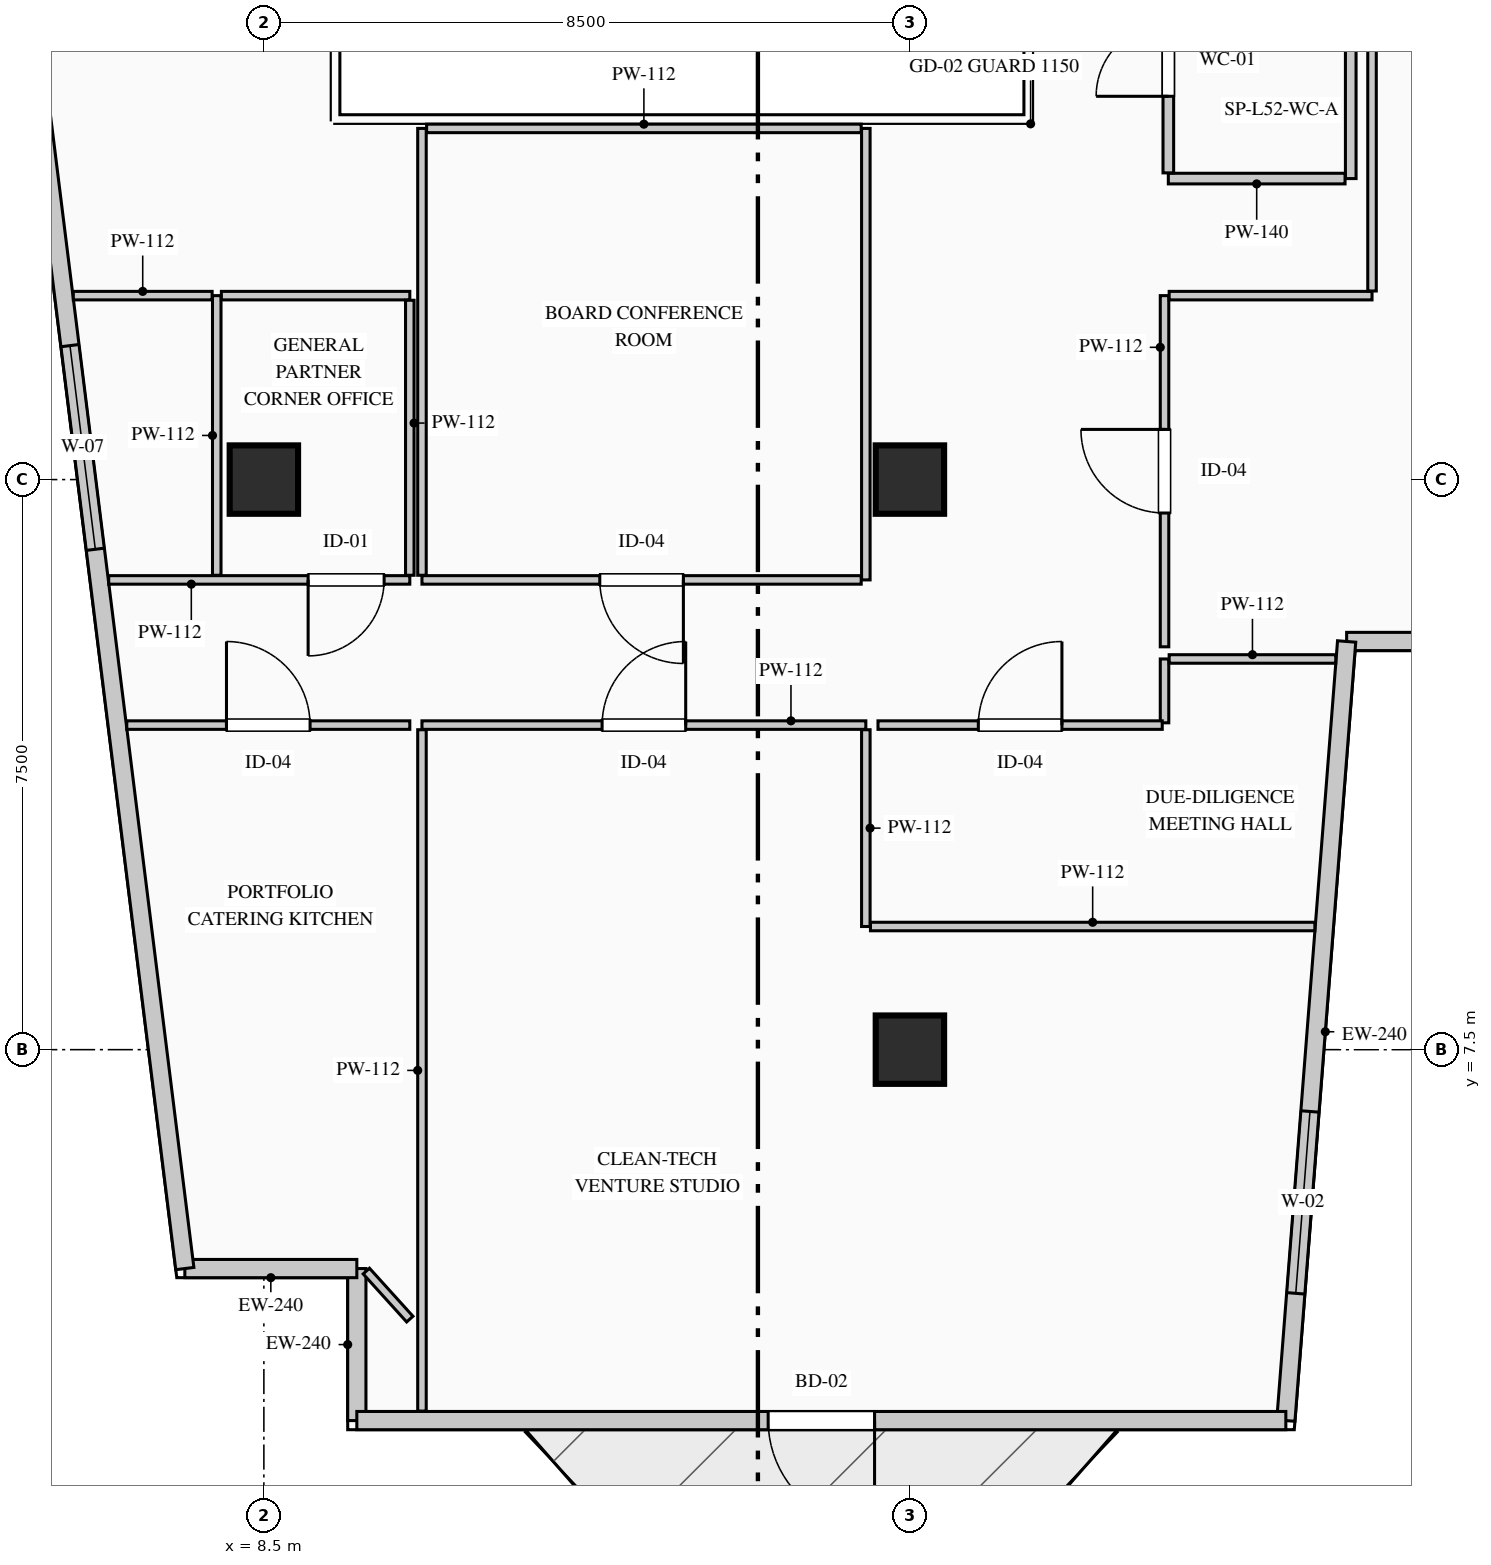
"""IFC4 building model, lengths in metres.
Left out: names, types, materials, properties, quantities, classifications, styles, units other than length and angle.
Written with IfcOpenShell. Run it as: python <this file> out.ifc"""

import sys

from ifc_helpers import new_model, si_unit, direction, frame, frame_2d, origin, origin_2d, place, context, subcontext, project, spatial, rectangle, extrude, element, fill, save


model = new_model("IFC4")
c1 = context("Model", 3, precision=1e-05, world=origin(), true_north=direction((0.0, 1.0)))
c2 = subcontext(c1, "Body", "Model", "MODEL_VIEW")
j1 = project(units=[si_unit("LENGTHUNIT", "METRE"), si_unit("PLANEANGLEUNIT", "RADIAN")], contexts=[c1])
p1 = place(None, origin())
s1 = spatial("IfcSite", under=j1, at=p1, CompositionType="ELEMENT")
p2 = place(p1, origin())
s2 = spatial("IfcBuilding", under=s1, at=p2, CompositionType="ELEMENT")
p3 = place(p2, frame((0.0, 0.0, 219.3)))
s3 = spatial("IfcBuildingStorey", under=s2, at=p3, CompositionType="ELEMENT", Elevation=219.3)
for number, where, z_axis, x_axis in (
    (1, (8.5, 15.0, 0.0), (0.0, 0.0, 1.0), (1.0, 0.0, 0.0)),
    (2, (17.0, 7.5, 0.0), (0.0, 0.0, 1.0), (1.0, 0.0, 0.0)),
    (3, (17.0, 15.0, 0.0), (0.0, 0.0, 1.0), (1.0, 0.0, 0.0)),
):
    element("IfcColumn", number, at=place(p3, frame(where, z_axis=z_axis, x_axis=x_axis)), inside=s3, PredefinedType="COLUMN", context=c2, shape_type="SweptSolid", body=[
        extrude(rectangle(XDim=0.9, YDim=0.9, at=origin_2d()), origin(), (0.0, 0.0, 1.0), 3.95),
    ])
p4 = place(p3, frame((9.723, 2.62, 0.0), z_axis=(0.0, 0.0, 1.0), x_axis=(0.0, 1.0, 0.0)))
e4 = element("IfcWall", 4, at=p4, inside=s3, PredefinedType="STANDARD", context=c2, shape_type="SweptSolid", body=[
    extrude(rectangle(XDim=2.0, YDim=0.24, at=frame_2d((1.0, 0.0))), origin(), (0.0, 0.0, 1.0), 3.7),
])
p5 = place(p3, frame((9.723, 4.62, 0.0), z_axis=(0.0, 0.0, 1.0), x_axis=(-1.0, 0.0, 0.0)))
e5 = element("IfcWall", 5, at=p5, inside=s3, PredefinedType="STANDARD", context=c2, shape_type="SweptSolid", body=[
    extrude(rectangle(XDim=2.263, YDim=0.24, at=frame_2d((1.131, 0.0))), origin(), (0.0, 0.0, 1.0), 3.7),
])
p6 = place(p3, frame((7.46, 4.62, 0.0), z_axis=(0.0, 0.0, 1.0), x_axis=(-0.123515576323, 0.992342633573, 0.0)))
e6 = element("IfcWall", 6, at=p6, inside=s3, PredefinedType="STANDARD", context=c2, shape_type="SweptSolid", body=[
    extrude(rectangle(XDim=37.043, YDim=0.24, at=frame_2d((18.522, 0.0))), origin(), (0.0, 0.0, 1.0), 3.7),
])
p7 = place(p6, frame((9.536, 0.0, 0.9)))
e7 = element("IfcOpeningElement", 7, at=p7, cuts=e6, PredefinedType="OPENING", context=c2, shape_type="SweptSolid", body=[
    extrude(rectangle(XDim=2.7, YDim=2.1, at=frame_2d((1.35, 1.05))), frame((0.0, 0.13, 0.0), z_axis=(0.0, -1.0, 0.0), x_axis=(1.0, 0.0, 0.0)), (0.0, 0.0, 1.0), 0.26),
])
p8 = place(p3, frame((29.581, 12.87, 0.0), z_axis=(0.0, 0.0, 1.0), x_axis=(-1.0, 0.0, 0.0)))
e8 = element("IfcWall", 8, at=p8, inside=s3, PredefinedType="STANDARD", context=c2, shape_type="SweptSolid", body=[
    extrude(rectangle(XDim=6.834, YDim=0.24, at=frame_2d((3.417, 0.0))), origin(), (0.0, 0.0, 1.0), 3.7),
])
p9 = place(p8, frame((1.26, 0.0, 0.9)))
e9 = element("IfcOpeningElement", 9, at=p9, cuts=e8, PredefinedType="OPENING", context=c2, shape_type="SweptSolid", body=[
    extrude(rectangle(XDim=2.4, YDim=2.1, at=frame_2d((1.2, 1.05))), frame((0.0, 0.13, 0.0), z_axis=(0.0, -1.0, 0.0), x_axis=(1.0, 0.0, 0.0)), (0.0, 0.0, 1.0), 0.26),
])
p10 = place(p3, frame((22.746, 12.87, 0.0), z_axis=(0.0, 0.0, 1.0), x_axis=(-0.077816860153, -0.996967670627, 0.0)))
e10 = element("IfcWall", 10, at=p10, inside=s3, PredefinedType="STANDARD", context=c2, shape_type="SweptSolid", body=[
    extrude(rectangle(XDim=10.281, YDim=0.24, at=frame_2d((5.141, 0.0))), origin(), (0.0, 0.0, 1.0), 3.7),
])
p11 = place(p10, frame((6.202, 0.0, 0.9)))
e11 = element("IfcOpeningElement", 11, at=p11, cuts=e10, PredefinedType="OPENING", context=c2, shape_type="SweptSolid", body=[
    extrude(rectangle(XDim=2.4, YDim=2.1, at=frame_2d((1.2, 1.05))), frame((0.0, 0.13, 0.0), z_axis=(0.0, -1.0, 0.0), x_axis=(1.0, 0.0, 0.0)), (0.0, 0.0, 1.0), 0.26),
])
p12 = place(p3, frame((21.946, 2.62, 0.0), z_axis=(0.0, 0.0, 1.0), x_axis=(-1.0, 0.0, 0.0)))
e12 = element("IfcWall", 12, at=p12, inside=s3, PredefinedType="STANDARD", context=c2, shape_type="SweptSolid", body=[
    extrude(rectangle(XDim=12.223, YDim=0.24, at=frame_2d((6.112, 0.0))), origin(), (0.0, 0.0, 1.0), 3.7),
])
p13 = place(p12, frame((5.411, 0.0, 0.0)))
e13 = element("IfcOpeningElement", 13, at=p13, cuts=e12, PredefinedType="OPENING", context=c2, shape_type="SweptSolid", body=[
    extrude(rectangle(XDim=1.4, YDim=2.2, at=frame_2d((0.7, 1.1))), frame((0.0, 0.13, 0.0), z_axis=(0.0, -1.0, 0.0), x_axis=(1.0, 0.0, 0.0)), (0.0, 0.0, 1.0), 0.26),
])
p14 = place(p3, frame((22.8, 22.0, 0.0), z_axis=(0.0, 0.0, 1.0), x_axis=(0.0, -1.0, 0.0)))
e14 = element("IfcWall", 14, at=p14, inside=s3, PredefinedType="PARTITIONING", context=c2, shape_type="SweptSolid", body=[
    extrude(rectangle(XDim=3.04, YDim=0.14, at=frame_2d((1.52, 0.0))), origin(), (0.0, 0.0, 1.0), 3.385),
])
p15 = place(p3, frame((22.725, 18.96, 0.0), z_axis=(0.0, 0.0, 1.0), x_axis=(-1.0, 0.0, 0.0)))
e15 = element("IfcWall", 15, at=p15, inside=s3, PredefinedType="PARTITIONING", context=c2, shape_type="SweptSolid", body=[
    extrude(rectangle(XDim=2.325, YDim=0.14, at=frame_2d((1.163, 0.0))), origin(), (0.0, 0.0, 1.0), 3.7),
])
p16 = place(p3, frame((20.4, 19.035, 0.0), z_axis=(0.0, 0.0, 1.0), x_axis=(0.0, 1.0, 0.0)))
e16 = element("IfcWall", 16, at=p16, inside=s3, PredefinedType="PARTITIONING", context=c2, shape_type="SweptSolid", body=[
    extrude(rectangle(XDim=2.965, YDim=0.14, at=frame_2d((1.482, 0.0))), origin(), (0.0, 0.0, 1.0), 3.7),
])
p17 = place(p16, frame((1.008, 0.0, 0.0)))
e17 = element("IfcOpeningElement", 17, at=p17, cuts=e16, PredefinedType="OPENING", context=c2, shape_type="SweptSolid", body=[
    extrude(rectangle(XDim=0.95, YDim=2.15, at=frame_2d((0.475, 1.075))), frame((0.0, 0.08, 0.0), z_axis=(0.0, -1.0, 0.0), x_axis=(1.0, 0.0, 0.0)), (0.0, 0.0, 1.0), 0.16),
])
p18 = place(p3, frame((10.58, 11.77, 0.0), z_axis=(0.0, 0.0, 1.0), x_axis=(1.0, 0.0, 0.0)))
e18 = element("IfcWall", 18, at=p18, inside=s3, PredefinedType="PARTITIONING", context=c2, shape_type="SweptSolid", body=[
    extrude(rectangle(XDim=5.84, YDim=0.112, at=frame_2d((2.92, 0.0))), origin(), (0.0, 0.0, 1.0), 3.7),
])
p19 = place(p18, frame((2.37, 0.0, 0.0)))
e19 = element("IfcOpeningElement", 19, at=p19, cuts=e18, PredefinedType="OPENING", context=c2, shape_type="SweptSolid", body=[
    extrude(rectangle(XDim=1.1, YDim=2.2, at=frame_2d((0.55, 1.1))), frame((0.0, 0.066, 0.0), z_axis=(0.0, -1.0, 0.0), x_axis=(1.0, 0.0, 0.0)), (0.0, 0.0, 1.0), 0.132),
])
p20 = place(p3, frame((16.42, 11.709, 0.0), z_axis=(0.0, 0.0, 1.0), x_axis=(0.0, -1.0, 0.0)))
e20 = element("IfcWall", 20, at=p20, inside=s3, PredefinedType="PARTITIONING", context=c2, shape_type="SweptSolid", body=[
    extrude(rectangle(XDim=2.589, YDim=0.112, at=frame_2d((1.294, 0.0))), origin(), (0.0, 0.0, 1.0), 3.7),
])
p21 = place(p3, frame((16.481, 9.12, 0.0), z_axis=(0.0, 0.0, 1.0), x_axis=(1.0, 0.0, 0.0)))
e21 = element("IfcWall", 21, at=p21, inside=s3, PredefinedType="PARTITIONING", context=c2, shape_type="SweptSolid", body=[
    extrude(rectangle(XDim=5.847, YDim=0.112, at=frame_2d((2.923, 0.0))), origin(), (0.0, 0.0, 1.0), 3.7),
])
p22 = place(p3, frame((10.58, 2.745, 0.0), z_axis=(0.0, 0.0, 1.0), x_axis=(0.0, 1.0, 0.0)))
e22 = element("IfcWall", 22, at=p22, inside=s3, PredefinedType="PARTITIONING", context=c2, shape_type="SweptSolid", body=[
    extrude(rectangle(XDim=8.964, YDim=0.112, at=frame_2d((4.482, 0.0))), origin(), (0.0, 0.0, 1.0), 3.7),
])
p23 = place(p3, frame((10.42, 3.955, 0.0), z_axis=(0.0, 0.0, 1.0), x_axis=(-0.671145806114, 0.741325371841, 0.0)))
e23 = element("IfcWall", 23, at=p23, inside=s3, PredefinedType="PARTITIONING", context=c2, shape_type="SweptSolid", body=[
    extrude(rectangle(XDim=0.852, YDim=0.112, at=frame_2d((0.426, 0.0))), origin(), (0.0, 0.0, 1.0), 3.7),
])
p24 = place(p3, frame((6.696, 11.77, 0.0), z_axis=(0.0, 0.0, 1.0), x_axis=(1.0, 0.0, 0.0)))
e24 = element("IfcWall", 24, at=p24, inside=s3, PredefinedType="PARTITIONING", context=c2, shape_type="SweptSolid", body=[
    extrude(rectangle(XDim=3.724, YDim=0.112, at=frame_2d((1.862, 0.0))), origin(), (0.0, 0.0, 1.0), 3.7),
])
p25 = place(p24, frame((1.312, 0.0, 0.0)))
e25 = element("IfcOpeningElement", 25, at=p25, cuts=e24, PredefinedType="OPENING", context=c2, shape_type="SweptSolid", body=[
    extrude(rectangle(XDim=1.1, YDim=2.2, at=frame_2d((0.55, 1.1))), frame((0.0, 0.066, 0.0), z_axis=(0.0, -1.0, 0.0), x_axis=(1.0, 0.0, 0.0)), (0.0, 0.0, 1.0), 0.132),
])
p26 = place(p3, frame((20.35, 11.8, 0.0), z_axis=(0.0, 0.0, 1.0), x_axis=(0.0, 1.0, 0.0)))
e26 = element("IfcWall", 26, at=p26, inside=s3, PredefinedType="PARTITIONING", context=c2, shape_type="SweptSolid", body=[
    extrude(rectangle(XDim=0.84, YDim=0.112, at=frame_2d((0.42, 0.0))), origin(), (0.0, 0.0, 1.0), 3.7),
])
p27 = place(p3, frame((20.411, 12.64, 0.0), z_axis=(0.0, 0.0, 1.0), x_axis=(1.0, 0.0, 0.0)))
e27 = element("IfcWall", 27, at=p27, inside=s3, PredefinedType="PARTITIONING", context=c2, shape_type="SweptSolid", body=[
    extrude(rectangle(XDim=2.192, YDim=0.112, at=frame_2d((1.096, 0.0))), origin(), (0.0, 0.0, 1.0), 3.7),
])
p28 = place(p3, frame((16.58, 11.77, 0.0), z_axis=(0.0, 0.0, 1.0), x_axis=(1.0, 0.0, 0.0)))
e28 = element("IfcWall", 28, at=p28, inside=s3, PredefinedType="PARTITIONING", context=c2, shape_type="SweptSolid", body=[
    extrude(rectangle(XDim=3.74, YDim=0.112, at=frame_2d((1.87, 0.0))), origin(), (0.0, 0.0, 1.0), 3.7),
])
p29 = place(p28, frame((1.32, 0.0, 0.0)))
e29 = element("IfcOpeningElement", 29, at=p29, cuts=e28, PredefinedType="OPENING", context=c2, shape_type="SweptSolid", body=[
    extrude(rectangle(XDim=1.1, YDim=2.2, at=frame_2d((0.55, 1.1))), frame((0.0, 0.066, 0.0), z_axis=(0.0, -1.0, 0.0), x_axis=(1.0, 0.0, 0.0)), (0.0, 0.0, 1.0), 0.132),
])
p30 = place(p3, frame((10.42, 13.68, 0.0), z_axis=(0.0, 0.0, 1.0), x_axis=(-1.0, 0.0, 0.0)))
e30 = element("IfcWall", 30, at=p30, inside=s3, PredefinedType="PARTITIONING", context=c2, shape_type="SweptSolid", body=[
    extrude(rectangle(XDim=3.961, YDim=0.112, at=frame_2d((1.981, 0.0))), origin(), (0.0, 0.0, 1.0), 3.7),
])
p31 = place(p30, frame((0.338, 0.0, 0.0)))
e31 = element("IfcOpeningElement", 31, at=p31, cuts=e30, PredefinedType="OPENING", context=c2, shape_type="SweptSolid", body=[
    extrude(rectangle(XDim=1.0, YDim=2.15, at=frame_2d((0.5, 1.075))), frame((0.0, 0.066, 0.0), z_axis=(0.0, -1.0, 0.0), x_axis=(1.0, 0.0, 0.0)), (0.0, 0.0, 1.0), 0.132),
])
p32 = place(p3, frame((7.88, 13.741, 0.0), z_axis=(0.0, 0.0, 1.0), x_axis=(0.0, 1.0, 0.0)))
e32 = element("IfcWall", 32, at=p32, inside=s3, PredefinedType="PARTITIONING", context=c2, shape_type="SweptSolid", body=[
    extrude(rectangle(XDim=3.679, YDim=0.112, at=frame_2d((1.839, 0.0))), origin(), (0.0, 0.0, 1.0), 3.7),
])
p33 = place(p3, frame((5.993, 17.42, 0.0), z_axis=(0.0, 0.0, 1.0), x_axis=(1.0, 0.0, 0.0)))
e33 = element("IfcWall", 33, at=p33, inside=s3, PredefinedType="PARTITIONING", context=c2, shape_type="SweptSolid", body=[
    extrude(rectangle(XDim=1.826, YDim=0.112, at=frame_2d((0.913, 0.0))), origin(), (0.0, 0.0, 1.0), 3.7),
])
p34 = place(p3, frame((7.941, 17.42, 0.0), z_axis=(0.0, 0.0, 1.0), x_axis=(1.0, 0.0, 0.0)))
e34 = element("IfcWall", 34, at=p34, inside=s3, PredefinedType="PARTITIONING", context=c2, shape_type="SweptSolid", body=[
    extrude(rectangle(XDim=2.479, YDim=0.112, at=frame_2d((1.24, 0.0))), origin(), (0.0, 0.0, 1.0), 3.7),
])
p35 = place(p3, frame((10.42, 17.359, 0.0), z_axis=(0.0, 0.0, 1.0), x_axis=(0.0, -1.0, 0.0)))
e35 = element("IfcWall", 35, at=p35, inside=s3, PredefinedType="PARTITIONING", context=c2, shape_type="SweptSolid", body=[
    extrude(rectangle(XDim=3.618, YDim=0.112, at=frame_2d((1.809, 0.0))), origin(), (0.0, 0.0, 1.0), 3.7),
])
p36 = place(p3, frame((16.42, 19.62, 0.0), z_axis=(0.0, 0.0, 1.0), x_axis=(0.0, -1.0, 0.0)))
e36 = element("IfcWall", 36, at=p36, inside=s3, PredefinedType="PARTITIONING", context=c2, shape_type="SweptSolid", body=[
    extrude(rectangle(XDim=5.94, YDim=0.112, at=frame_2d((2.97, 0.0))), origin(), (0.0, 0.0, 1.0), 3.7),
])
p37 = place(p3, frame((16.359, 13.68, 0.0), z_axis=(0.0, 0.0, 1.0), x_axis=(-1.0, 0.0, 0.0)))
e37 = element("IfcWall", 37, at=p37, inside=s3, PredefinedType="PARTITIONING", context=c2, shape_type="SweptSolid", body=[
    extrude(rectangle(XDim=5.779, YDim=0.112, at=frame_2d((2.889, 0.0))), origin(), (0.0, 0.0, 1.0), 3.7),
])
p38 = place(p37, frame((2.34, 0.0, 0.0)))
e38 = element("IfcOpeningElement", 38, at=p38, cuts=e37, PredefinedType="OPENING", context=c2, shape_type="SweptSolid", body=[
    extrude(rectangle(XDim=1.1, YDim=2.2, at=frame_2d((0.55, 1.1))), frame((0.0, 0.066, 0.0), z_axis=(0.0, -1.0, 0.0), x_axis=(1.0, 0.0, 0.0)), (0.0, 0.0, 1.0), 0.132),
])
p39 = place(p3, frame((10.58, 13.741, 0.0), z_axis=(0.0, 0.0, 1.0), x_axis=(0.0, 1.0, 0.0)))
e39 = element("IfcWall", 39, at=p39, inside=s3, PredefinedType="PARTITIONING", context=c2, shape_type="SweptSolid", body=[
    extrude(rectangle(XDim=5.879, YDim=0.112, at=frame_2d((2.939, 0.0))), origin(), (0.0, 0.0, 1.0), 3.7),
])
p40 = place(p3, frame((10.641, 19.62, 0.0), z_axis=(0.0, 0.0, 1.0), x_axis=(1.0, 0.0, 0.0)))
e40 = element("IfcWall", 40, at=p40, inside=s3, PredefinedType="PARTITIONING", context=c2, shape_type="SweptSolid", body=[
    extrude(rectangle(XDim=5.718, YDim=0.112, at=frame_2d((2.859, 0.0))), origin(), (0.0, 0.0, 1.0), 3.7),
])
p41 = place(p3, frame((20.35, 12.8, 0.0), z_axis=(0.0, 0.0, 1.0), x_axis=(0.0, 1.0, 0.0)))
e41 = element("IfcWall", 41, at=p41, inside=s3, PredefinedType="PARTITIONING", context=c2, shape_type="SweptSolid", body=[
    extrude(rectangle(XDim=4.62, YDim=0.112, at=frame_2d((2.31, 0.0))), origin(), (0.0, 0.0, 1.0), 3.7),
])
p42 = place(p41, frame((1.76, 0.0, 0.0)))
e42 = element("IfcOpeningElement", 42, at=p42, cuts=e41, PredefinedType="OPENING", context=c2, shape_type="SweptSolid", body=[
    extrude(rectangle(XDim=1.1, YDim=2.2, at=frame_2d((0.55, 1.1))), frame((0.0, 0.066, 0.0), z_axis=(0.0, -1.0, 0.0), x_axis=(1.0, 0.0, 0.0)), (0.0, 0.0, 1.0), 0.132),
])
p43 = place(p3, frame((20.411, 17.42, 0.0), z_axis=(0.0, 0.0, 1.0), x_axis=(1.0, 0.0, 0.0)))
e43 = element("IfcWall", 43, at=p43, inside=s3, PredefinedType="PARTITIONING", context=c2, shape_type="SweptSolid", body=[
    extrude(rectangle(XDim=2.669, YDim=0.112, at=frame_2d((1.334, 0.0))), origin(), (0.0, 0.0, 1.0), 3.7),
])
p44 = place(p3, frame((23.08, 17.481, 0.0), z_axis=(0.0, 0.0, 1.0), x_axis=(0.0, 1.0, 0.0)))
e44 = element("IfcWall", 44, at=p44, inside=s3, PredefinedType="PARTITIONING", context=c2, shape_type="SweptSolid", body=[
    extrude(rectangle(XDim=6.939, YDim=0.112, at=frame_2d((3.469, 0.0))), origin(), (0.0, 0.0, 1.0), 3.385),
])
p45 = place(p7, origin())
e45 = element("IfcWindow", 45, at=p45, inside=s3, PartitioningType="DOUBLE_PANEL_VERTICAL", PredefinedType="WINDOW", context=c2, shape_type="SweptSolid", body=[
    extrude(rectangle(XDim=2.7, YDim=2.1, at=frame_2d((1.35, 1.05))), frame((0.0, 0.03, 0.0), z_axis=(0.0, -1.0, 0.0), x_axis=(1.0, 0.0, 0.0)), (0.0, 0.0, 1.0), 0.06),
])
fill(e7, e45)
p46 = place(p11, origin())
e46 = element("IfcWindow", 46, at=p46, inside=s3, PartitioningType="DOUBLE_PANEL_VERTICAL", PredefinedType="WINDOW", context=c2, shape_type="SweptSolid", body=[
    extrude(rectangle(XDim=2.4, YDim=2.1, at=frame_2d((1.2, 1.05))), frame((0.0, 0.03, 0.0), z_axis=(0.0, -1.0, 0.0), x_axis=(1.0, 0.0, 0.0)), (0.0, 0.0, 1.0), 0.06),
])
fill(e11, e46)
p47 = place(p13, origin())
e47 = element("IfcDoor", 47, at=p47, inside=s3, OperationType="SINGLE_SWING_LEFT", PredefinedType="DOOR", context=c2, shape_type="SweptSolid", body=[
    extrude(rectangle(XDim=1.4, YDim=2.2, at=frame_2d((0.7, 1.1))), frame((0.0, 0.025, 0.0), z_axis=(0.0, -1.0, 0.0), x_axis=(1.0, 0.0, 0.0)), (0.0, 0.0, 1.0), 0.05),
])
fill(e13, e47)
p48 = place(p17, origin())
e48 = element("IfcDoor", 48, at=p48, inside=s3, OperationType="SINGLE_SWING_LEFT", PredefinedType="DOOR", context=c2, shape_type="SweptSolid", body=[
    extrude(rectangle(XDim=0.95, YDim=2.15, at=frame_2d((0.475, 1.075))), frame((0.0, 0.025, 0.0), z_axis=(0.0, -1.0, 0.0), x_axis=(1.0, 0.0, 0.0)), (0.0, 0.0, 1.0), 0.05),
])
fill(e17, e48)
p49 = place(p19, origin())
e49 = element("IfcDoor", 49, at=p49, inside=s3, OperationType="SINGLE_SWING_RIGHT", PredefinedType="DOOR", context=c2, shape_type="SweptSolid", body=[
    extrude(rectangle(XDim=1.1, YDim=2.2, at=frame_2d((0.55, 1.1))), frame((0.0, 0.025, 0.0), z_axis=(0.0, -1.0, 0.0), x_axis=(1.0, 0.0, 0.0)), (0.0, 0.0, 1.0), 0.05),
])
fill(e19, e49)
p50 = place(p25, origin())
e50 = element("IfcDoor", 50, at=p50, inside=s3, OperationType="SINGLE_SWING_LEFT", PredefinedType="DOOR", context=c2, shape_type="SweptSolid", body=[
    extrude(rectangle(XDim=1.1, YDim=2.2, at=frame_2d((0.55, 1.1))), frame((0.0, 0.025, 0.0), z_axis=(0.0, -1.0, 0.0), x_axis=(1.0, 0.0, 0.0)), (0.0, 0.0, 1.0), 0.05),
])
fill(e25, e50)
p51 = place(p29, origin())
e51 = element("IfcDoor", 51, at=p51, inside=s3, OperationType="SINGLE_SWING_RIGHT", PredefinedType="DOOR", context=c2, shape_type="SweptSolid", body=[
    extrude(rectangle(XDim=1.1, YDim=2.2, at=frame_2d((0.55, 1.1))), frame((0.0, 0.025, 0.0), z_axis=(0.0, -1.0, 0.0), x_axis=(1.0, 0.0, 0.0)), (0.0, 0.0, 1.0), 0.05),
])
fill(e29, e51)
p52 = place(p31, origin())
e52 = element("IfcDoor", 52, at=p52, inside=s3, OperationType="SINGLE_SWING_RIGHT", PredefinedType="DOOR", context=c2, shape_type="SweptSolid", body=[
    extrude(rectangle(XDim=1.0, YDim=2.15, at=frame_2d((0.5, 1.075))), frame((0.0, 0.025, 0.0), z_axis=(0.0, -1.0, 0.0), x_axis=(1.0, 0.0, 0.0)), (0.0, 0.0, 1.0), 0.05),
])
fill(e31, e52)
p53 = place(p38, origin())
e53 = element("IfcDoor", 53, at=p53, inside=s3, OperationType="SINGLE_SWING_LEFT", PredefinedType="DOOR", context=c2, shape_type="SweptSolid", body=[
    extrude(rectangle(XDim=1.1, YDim=2.2, at=frame_2d((0.55, 1.1))), frame((0.0, 0.025, 0.0), z_axis=(0.0, -1.0, 0.0), x_axis=(1.0, 0.0, 0.0)), (0.0, 0.0, 1.0), 0.05),
])
fill(e38, e53)
p54 = place(p42, origin())
e54 = element("IfcDoor", 54, at=p54, inside=s3, OperationType="SINGLE_SWING_RIGHT", PredefinedType="DOOR", context=c2, shape_type="SweptSolid", body=[
    extrude(rectangle(XDim=1.1, YDim=2.2, at=frame_2d((0.55, 1.1))), frame((0.0, 0.025, 0.0), z_axis=(0.0, -1.0, 0.0), x_axis=(1.0, 0.0, 0.0)), (0.0, 0.0, 1.0), 0.05),
])
fill(e42, e54)
save(model, sys.argv[1])
